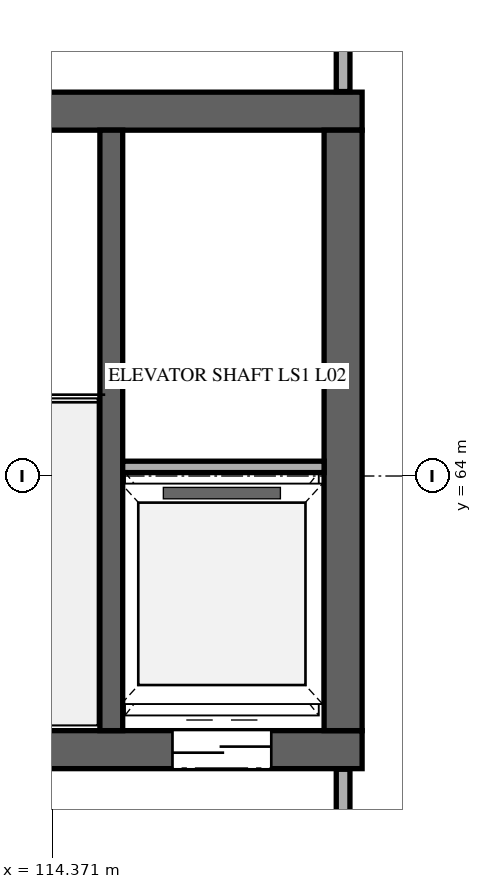
"""IFC4 building model, lengths in metres.
Left out: names, types, materials, properties, quantities, classifications, styles, units other than length and angle.
Written with IfcOpenShell. Run it as: python <this file> out.ifc"""

import sys

from ifc_helpers import new_model, si_unit, direction, frame, frame_2d, origin, place, context, subcontext, project, spatial, rectangle, extrude, element, fill, save


model = new_model("IFC4")
c1 = context("Model", 3, precision=1e-05, world=origin(), true_north=direction((0.0, 1.0)))
c2 = subcontext(c1, "Body", "Model", "MODEL_VIEW")
j1 = project(units=[si_unit("LENGTHUNIT", "METRE"), si_unit("PLANEANGLEUNIT", "RADIAN")], contexts=[c1])
p1 = place(None, origin())
s1 = spatial("IfcSite", under=j1, at=p1, CompositionType="ELEMENT")
p2 = place(p1, origin())
s2 = spatial("IfcBuilding", under=s1, at=p2, CompositionType="ELEMENT")
p3 = place(p2, frame((0.0, 0.0, 10.2)))
s3 = spatial("IfcBuildingStorey", under=s2, at=p3, CompositionType="ELEMENT", Elevation=10.2)
p4 = place(p3, frame((105.48, 60.4, 0.0), z_axis=(0.0, 0.0, 1.0), x_axis=(1.0, 0.0, 0.0)))
e1 = element("IfcWall", 1, at=p4, inside=s3, PredefinedType="SHEAR", context=c2, shape_type="SweptSolid", body=[
    extrude(rectangle(XDim=12.97, YDim=0.5, at=frame_2d((6.485, 0.0))), origin(), (0.0, 0.0, 1.0), 4.5),
])
p5 = place(p4, frame((1.27, 0.0, 0.0)))
e2 = element("IfcOpeningElement", 2, at=p5, cuts=e1, PredefinedType="OPENING", context=c2, shape_type="SweptSolid", body=[
    extrude(rectangle(XDim=1.15, YDim=2.25, at=frame_2d((0.575, 1.125))), frame((0.0, 0.26, 0.0), z_axis=(0.0, -1.0, 0.0), x_axis=(1.0, 0.0, 0.0)), (0.0, 0.0, 1.0), 0.52),
])
p6 = place(p4, frame((10.475, 0.0, 0.0)))
e3 = element("IfcOpeningElement", 3, at=p6, cuts=e1, PredefinedType="OPENING", context=c2, shape_type="SweptSolid", body=[
    extrude(rectangle(XDim=1.3, YDim=2.3, at=frame_2d((0.65, 1.15))), frame((0.0, 0.26, 0.0), z_axis=(0.0, -1.0, 0.0), x_axis=(1.0, 0.0, 0.0)), (0.0, 0.0, 1.0), 0.52),
])
p7 = place(p3, frame((105.48, 68.8, 0.0), z_axis=(0.0, 0.0, 1.0), x_axis=(1.0, 0.0, 0.0)))
e4 = element("IfcWall", 4, at=p7, inside=s3, PredefinedType="SHEAR", context=c2, shape_type="SweptSolid", body=[
    extrude(rectangle(XDim=12.97, YDim=0.5, at=frame_2d((6.485, 0.0))), origin(), (0.0, 0.0, 1.0), 4.5),
])
p8 = place(p3, frame((118.2, 60.65, 0.0), z_axis=(0.0, 0.0, 1.0), x_axis=(0.0, 1.0, 0.0)))
e5 = element("IfcWall", 5, at=p8, inside=s3, PredefinedType="SHEAR", context=c2, shape_type="SweptSolid", body=[
    extrude(rectangle(XDim=7.9, YDim=0.5, at=frame_2d((3.95, 0.0))), origin(), (0.0, 0.0, 1.0), 4.5),
])
p9 = place(p3, frame((115.15, 60.65, 0.0), z_axis=(0.0, 0.0, 1.0), x_axis=(0.0, 1.0, 0.0)))
e6 = element("IfcWall", 6, at=p9, inside=s3, PredefinedType="SHEAR", context=c2, shape_type="SweptSolid", body=[
    extrude(rectangle(XDim=7.9, YDim=0.3, at=frame_2d((3.95, 0.0))), origin(), (0.0, 0.0, 1.0), 4.5),
])
p10 = place(p3, frame((115.3, 64.12, 0.0), z_axis=(0.0, 0.0, 1.0), x_axis=(1.0, 0.0, 0.0)))
e7 = element("IfcWall", 7, at=p10, inside=s3, PredefinedType="PARTITIONING", context=c2, shape_type="SweptSolid", body=[
    extrude(rectangle(XDim=2.65, YDim=0.15, at=frame_2d((1.325, 0.0))), origin(), (0.0, 0.0, 1.0), 4.24),
])
p11 = place(p3, frame((118.2, 56.168, 0.0), z_axis=(0.0, 0.0, 1.0), x_axis=(0.0, 1.0, 0.0)))
e8 = element("IfcWall", 8, at=p11, inside=s3, PredefinedType="PARTITIONING", context=c2, shape_type="SweptSolid", body=[
    extrude(rectangle(XDim=3.974, YDim=0.18, at=frame_2d((1.987, 0.0))), origin(), (0.0, 0.0, 1.0), 4.24),
])
p12 = place(p11, frame((1.387, 0.0, 0.0)))
e9 = element("IfcOpeningElement", 9, at=p12, cuts=e8, PredefinedType="OPENING", context=c2, shape_type="SweptSolid", body=[
    extrude(rectangle(XDim=1.2, YDim=2.2, at=frame_2d((0.6, 1.1))), frame((0.0, 0.1, 0.0), z_axis=(0.0, -1.0, 0.0), x_axis=(1.0, 0.0, 0.0)), (0.0, 0.0, 1.0), 0.2),
])
p13 = place(p3, frame((118.2, 69.058, 0.0), z_axis=(0.0, 0.0, 1.0), x_axis=(0.0, 1.0, 0.0)))
e10 = element("IfcWall", 10, at=p13, inside=s3, PredefinedType="PARTITIONING", context=c2, shape_type="SweptSolid", body=[
    extrude(rectangle(XDim=12.434, YDim=0.18, at=frame_2d((6.217, 0.0))), origin(), (0.0, 0.0, 1.0), 4.24),
])
p14 = place(p13, frame((5.667, 0.0, 0.0)))
e11 = element("IfcOpeningElement", 11, at=p14, cuts=e10, PredefinedType="OPENING", context=c2, shape_type="SweptSolid", body=[
    extrude(rectangle(XDim=1.1, YDim=2.2, at=frame_2d((0.55, 1.1))), frame((0.0, 0.1, 0.0), z_axis=(0.0, -1.0, 0.0), x_axis=(1.0, 0.0, 0.0)), (0.0, 0.0, 1.0), 0.2),
])
p15 = place(p6, frame((1.3, 0.0, 0.0), z_axis=(0.0, 0.0, 1.0), x_axis=(-1.0, 0.0, 0.0)))
e12 = element("IfcDoor", 12, at=p15, inside=s3, OperationType="DOUBLE_DOOR_SLIDING", PredefinedType="DOOR", context=c2, shape_type="SweptSolid", body=[
    extrude(rectangle(XDim=1.3, YDim=2.3, at=frame_2d((0.65, 1.15))), frame((0.0, 0.025, 0.0), z_axis=(0.0, -1.0, 0.0), x_axis=(1.0, 0.0, 0.0)), (0.0, 0.0, 1.0), 0.05),
])
fill(e3, e12)
save(model, sys.argv[1])
